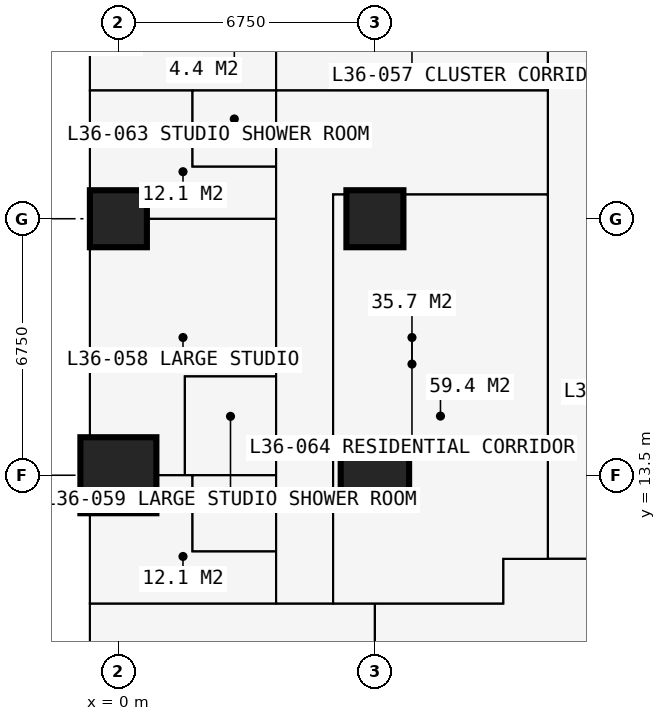
"""IFC4 building model, lengths in metres.
Left out: names, types, materials, properties, quantities, classifications, styles, units other than length and angle.
Written with IfcOpenShell. Run it as: python <this file> out.ifc"""

import sys

from ifc_helpers import new_model, si_unit, direction, frame, frame_2d, origin, origin_2d, place, context, subcontext, project, spatial, rectangle, extrude, element, fill, save


model = new_model("IFC4")
c1 = context("Model", 3, precision=1e-05, world=origin(), true_north=direction((0.0, 1.0)))
c2 = subcontext(c1, "Body", "Model", "MODEL_VIEW")
j1 = project(units=[si_unit("LENGTHUNIT", "METRE"), si_unit("PLANEANGLEUNIT", "RADIAN")], contexts=[c1])
p1 = place(None, origin())
s1 = spatial("IfcSite", under=j1, at=p1, CompositionType="ELEMENT")
p2 = place(p1, origin())
s2 = spatial("IfcBuilding", under=s1, at=p2, CompositionType="ELEMENT")
p3 = place(p2, frame((0.0, 0.0, 134.1)))
s3 = spatial("IfcBuildingStorey", under=s2, at=p3, CompositionType="ELEMENT", Elevation=134.1)
p4 = place(p3, frame((0.0, 13.5, 0.0), z_axis=(0.0, 0.0, 1.0), x_axis=(1.0, 0.0, 0.0)))
e1 = element("IfcColumn", 1, at=p4, inside=s3, PredefinedType="COLUMN", context=c2, shape_type="SweptSolid", body=[
    extrude(rectangle(XDim=2.0, YDim=2.0, at=origin_2d()), origin(), (0.0, 0.0, 1.0), 3.6),
])
p5 = place(p3, frame((0.0, 20.25, 0.0), z_axis=(0.0, 0.0, 1.0), x_axis=(1.0, 0.0, 0.0)))
e2 = element("IfcColumn", 2, at=p5, inside=s3, PredefinedType="COLUMN", context=c2, shape_type="SweptSolid", body=[
    extrude(rectangle(XDim=1.5, YDim=1.5, at=origin_2d()), origin(), (0.0, 0.0, 1.0), 3.6),
])
p6 = place(p3, frame((6.75, 13.5, 0.0), z_axis=(0.0, 0.0, 1.0), x_axis=(1.0, 0.0, 0.0)))
e3 = element("IfcColumn", 3, at=p6, inside=s3, PredefinedType="COLUMN", context=c2, shape_type="SweptSolid", body=[
    extrude(rectangle(XDim=1.8, YDim=1.8, at=origin_2d()), origin(), (0.0, 0.0, 1.0), 3.6),
])
p7 = place(p3, frame((6.75, 20.25, 0.0), z_axis=(0.0, 0.0, 1.0), x_axis=(1.0, 0.0, 0.0)))
e4 = element("IfcColumn", 4, at=p7, inside=s3, PredefinedType="COLUMN", context=c2, shape_type="SweptSolid", body=[
    extrude(rectangle(XDim=1.5, YDim=1.5, at=origin_2d()), origin(), (0.0, 0.0, 1.0), 3.6),
])
p8 = place(p3, frame((-0.734, 10.125, 0.0), z_axis=(0.0, 0.0, 1.0), x_axis=(1.0, 0.0, 0.0)))
e5 = element("IfcWall", 5, at=p8, inside=s3, PredefinedType="PARTITIONING", context=c2, shape_type="SweptSolid", body=[
    extrude(rectangle(XDim=10.859, YDim=0.15, at=frame_2d((5.429, 0.0))), origin(), (0.0, 0.0, 1.0), 3.3),
])
for number, where, z_axis, x_axis in (
    (6, (-0.734, 13.5, 0.0), (0.0, 0.0, 1.0), (1.0, 0.0, 0.0)),
    (7, (-0.734, 20.25, 0.0), (0.0, 0.0, 1.0), (1.0, 0.0, 0.0)),
):
    element("IfcWall", number, at=place(p3, frame(where, z_axis=z_axis, x_axis=x_axis)), inside=s3, PredefinedType="PARTITIONING", context=c2, shape_type="SweptSolid", body=[
        extrude(rectangle(XDim=4.884, YDim=0.175, at=frame_2d((2.442, 0.0))), origin(), (0.0, 0.0, 1.0), 2.802),
    ])
p9 = place(p3, frame((-0.734, 23.625, 0.0), z_axis=(0.0, 0.0, 1.0), x_axis=(1.0, 0.0, 0.0)))
e8 = element("IfcWall", 8, at=p9, inside=s3, PredefinedType="PARTITIONING", context=c2, shape_type="SweptSolid", body=[
    extrude(rectangle(XDim=12.034, YDim=0.15, at=frame_2d((6.017, 0.0))), origin(), (0.0, 0.0, 1.0), 3.3),
])
p10 = place(p3, frame((1.75, 13.5, 0.0), z_axis=(0.0, 0.0, 1.0), x_axis=(0.0, 1.0, 0.0)))
e9 = element("IfcWall", 9, at=p10, inside=s3, PredefinedType="PARTITIONING", context=c2, shape_type="SweptSolid", body=[
    extrude(rectangle(XDim=2.6, YDim=0.1, at=frame_2d((1.3, 0.0))), origin(), (0.0, 0.0, 1.0), 3.3),
])
p11 = place(p10, frame((1.05, 0.0, 0.0)))
e10 = element("IfcOpeningElement", 10, at=p11, cuts=e9, PredefinedType="OPENING", context=c2, shape_type="SweptSolid", body=[
    extrude(rectangle(XDim=0.9, YDim=2.2, at=frame_2d((0.45, 1.1))), frame((0.0, 0.06, 0.0), z_axis=(0.0, -1.0, 0.0), x_axis=(1.0, 0.0, 0.0)), (0.0, 0.0, 1.0), 0.12),
])
p12 = place(p3, frame((1.75, 16.1, 0.0), z_axis=(0.0, 0.0, 1.0), x_axis=(1.0, 0.0, 0.0)))
e11 = element("IfcWall", 11, at=p12, inside=s3, PredefinedType="PARTITIONING", context=c2, shape_type="SweptSolid", body=[
    extrude(rectangle(XDim=2.4, YDim=0.1, at=frame_2d((1.2, 0.0))), origin(), (0.0, 0.0, 1.0), 3.3),
])
p13 = place(p3, frame((1.95, 11.5, 0.0), z_axis=(0.0, 0.0, 1.0), x_axis=(0.0, 1.0, 0.0)))
e12 = element("IfcWall", 12, at=p13, inside=s3, PredefinedType="PARTITIONING", context=c2, shape_type="SweptSolid", body=[
    extrude(rectangle(XDim=2.0, YDim=0.1, at=frame_2d((1.0, 0.0))), origin(), (0.0, 0.0, 1.0), 3.3),
])
p14 = place(p3, frame((1.95, 11.5, 0.0), z_axis=(0.0, 0.0, 1.0), x_axis=(1.0, 0.0, 0.0)))
e13 = element("IfcWall", 13, at=p14, inside=s3, PredefinedType="PARTITIONING", context=c2, shape_type="SweptSolid", body=[
    extrude(rectangle(XDim=2.2, YDim=0.1, at=frame_2d((1.1, 0.0))), origin(), (0.0, 0.0, 1.0), 3.3),
])
p15 = place(p14, frame((0.65, 0.0, 0.0)))
e14 = element("IfcOpeningElement", 14, at=p15, cuts=e13, PredefinedType="OPENING", context=c2, shape_type="SweptSolid", body=[
    extrude(rectangle(XDim=0.9, YDim=2.2, at=frame_2d((0.45, 1.1))), frame((0.0, 0.06, 0.0), z_axis=(0.0, -1.0, 0.0), x_axis=(1.0, 0.0, 0.0)), (0.0, 0.0, 1.0), 0.12),
])
p16 = place(p3, frame((1.95, 21.625, 0.0), z_axis=(0.0, 0.0, 1.0), x_axis=(0.0, 1.0, 0.0)))
e15 = element("IfcWall", 15, at=p16, inside=s3, PredefinedType="PARTITIONING", context=c2, shape_type="SweptSolid", body=[
    extrude(rectangle(XDim=2.0, YDim=0.1, at=frame_2d((1.0, 0.0))), origin(), (0.0, 0.0, 1.0), 3.3),
])
p17 = place(p3, frame((1.95, 21.625, 0.0), z_axis=(0.0, 0.0, 1.0), x_axis=(1.0, 0.0, 0.0)))
e16 = element("IfcWall", 16, at=p17, inside=s3, PredefinedType="PARTITIONING", context=c2, shape_type="SweptSolid", body=[
    extrude(rectangle(XDim=2.2, YDim=0.1, at=frame_2d((1.1, 0.0))), origin(), (0.0, 0.0, 1.0), 3.3),
])
p18 = place(p17, frame((0.65, 0.0, 0.0)))
e17 = element("IfcOpeningElement", 17, at=p18, cuts=e16, PredefinedType="OPENING", context=c2, shape_type="SweptSolid", body=[
    extrude(rectangle(XDim=0.9, YDim=2.2, at=frame_2d((0.45, 1.1))), frame((0.0, 0.06, 0.0), z_axis=(0.0, -1.0, 0.0), x_axis=(1.0, 0.0, 0.0)), (0.0, 0.0, 1.0), 0.12),
])
p19 = place(p3, frame((4.15, 10.125, 0.0), z_axis=(0.0, 0.0, 1.0), x_axis=(0.0, 1.0, 0.0)))
e18 = element("IfcWall", 18, at=p19, inside=s3, PredefinedType="PARTITIONING", context=c2, shape_type="SweptSolid", body=[
    extrude(rectangle(XDim=16.875, YDim=0.15, at=frame_2d((8.438, 0.0))), origin(), (0.0, 0.0, 1.0), 3.3),
])
p20 = place(p19, frame((13.7, 0.0, 0.0)))
e19 = element("IfcOpeningElement", 19, at=p20, cuts=e18, PredefinedType="OPENING", context=c2, shape_type="SweptSolid", body=[
    extrude(rectangle(XDim=0.95, YDim=2.2, at=frame_2d((0.475, 1.1))), frame((0.0, 0.085, 0.0), z_axis=(0.0, -1.0, 0.0), x_axis=(1.0, 0.0, 0.0)), (0.0, 0.0, 1.0), 0.17),
])
p21 = place(p19, frame((7.575, 0.0, 0.0)))
e20 = element("IfcOpeningElement", 20, at=p21, cuts=e18, PredefinedType="OPENING", context=c2, shape_type="SweptSolid", body=[
    extrude(rectangle(XDim=0.95, YDim=2.2, at=frame_2d((0.475, 1.1))), frame((0.0, 0.085, 0.0), z_axis=(0.0, -1.0, 0.0), x_axis=(1.0, 0.0, 0.0)), (0.0, 0.0, 1.0), 0.17),
])
p22 = place(p19, frame((0.2, 0.0, 0.0)))
e21 = element("IfcOpeningElement", 21, at=p22, cuts=e18, PredefinedType="OPENING", context=c2, shape_type="SweptSolid", body=[
    extrude(rectangle(XDim=0.95, YDim=2.2, at=frame_2d((0.475, 1.1))), frame((0.0, 0.085, 0.0), z_axis=(0.0, -1.0, 0.0), x_axis=(1.0, 0.0, 0.0)), (0.0, 0.0, 1.0), 0.17),
])
p23 = place(p19, frame((10.375, 0.0, 0.0)))
e22 = element("IfcOpeningElement", 22, at=p23, cuts=e18, PredefinedType="OPENING", context=c2, shape_type="SweptSolid", body=[
    extrude(rectangle(XDim=0.95, YDim=2.2, at=frame_2d((0.475, 1.1))), frame((0.0, 0.085, 0.0), z_axis=(0.0, -1.0, 0.0), x_axis=(1.0, 0.0, 0.0)), (0.0, 0.0, 1.0), 0.17),
])
p24 = place(p3, frame((5.65, 10.125, 0.0), z_axis=(0.0, 0.0, 1.0), x_axis=(0.0, 1.0, 0.0)))
e23 = element("IfcWall", 23, at=p24, inside=s3, PredefinedType="PARTITIONING", context=c2, shape_type="SweptSolid", body=[
    extrude(rectangle(XDim=10.762, YDim=0.15, at=frame_2d((5.381, 0.0))), origin(), (0.0, 0.0, 1.0), 3.3),
])
p25 = place(p24, frame((4.9, 0.0, 0.0)))
e24 = element("IfcOpeningElement", 24, at=p25, cuts=e23, PredefinedType="OPENING", context=c2, shape_type="SweptSolid", body=[
    extrude(rectangle(XDim=0.95, YDim=2.2, at=frame_2d((0.475, 1.1))), frame((0.0, 0.085, 0.0), z_axis=(0.0, -1.0, 0.0), x_axis=(1.0, 0.0, 0.0)), (0.0, 0.0, 1.0), 0.17),
])
p26 = place(p3, frame((5.65, 20.887, 0.0), z_axis=(0.0, 0.0, 1.0), x_axis=(1.0, 0.0, 0.0)))
e25 = element("IfcWall", 25, at=p26, inside=s3, PredefinedType="PARTITIONING", context=c2, shape_type="SweptSolid", body=[
    extrude(rectangle(XDim=5.65, YDim=0.15, at=frame_2d((2.825, 0.0))), origin(), (0.0, 0.0, 1.0), 3.3),
])
p27 = place(p3, frame((6.75, 4.15, 0.0), z_axis=(0.0, 0.0, 1.0), x_axis=(0.0, 1.0, 0.0)))
e26 = element("IfcWall", 26, at=p27, inside=s3, PredefinedType="PARTITIONING", context=c2, shape_type="SweptSolid", body=[
    extrude(rectangle(XDim=5.975, YDim=0.15, at=frame_2d((2.988, 0.0))), origin(), (0.0, 0.0, 1.0), 2.802),
])
p28 = place(p3, frame((10.125, 10.125, 0.0), z_axis=(0.0, 0.0, 1.0), x_axis=(0.0, 1.0, 0.0)))
e27 = element("IfcWall", 27, at=p28, inside=s3, PredefinedType="PARTITIONING", context=c2, shape_type="SweptSolid", body=[
    extrude(rectangle(XDim=1.175, YDim=0.15, at=frame_2d((0.587, 0.0))), origin(), (0.0, 0.0, 1.0), 3.3),
])
p29 = place(p3, frame((10.125, 11.3, 0.0), z_axis=(0.0, 0.0, 1.0), x_axis=(1.0, 0.0, 0.0)))
e28 = element("IfcWall", 28, at=p29, inside=s3, PredefinedType="PARTITIONING", context=c2, shape_type="SweptSolid", body=[
    extrude(rectangle(XDim=20.675, YDim=0.15, at=frame_2d((10.337, 0.0))), origin(), (0.0, 0.0, 1.0), 3.3),
])
p30 = place(p29, frame((8.375, 0.0, 0.0)))
e29 = element("IfcOpeningElement", 29, at=p30, cuts=e28, PredefinedType="OPENING", context=c2, shape_type="SweptSolid", body=[
    extrude(rectangle(XDim=1.0, YDim=2.2, at=frame_2d((0.5, 1.1))), frame((0.0, 0.085, 0.0), z_axis=(0.0, -1.0, 0.0), x_axis=(1.0, 0.0, 0.0)), (0.0, 0.0, 1.0), 0.17),
])
p31 = place(p29, frame((10.975, 0.0, 0.0)))
e30 = element("IfcOpeningElement", 30, at=p31, cuts=e28, PredefinedType="OPENING", context=c2, shape_type="SweptSolid", body=[
    extrude(rectangle(XDim=1.0, YDim=2.2, at=frame_2d((0.5, 1.1))), frame((0.0, 0.085, 0.0), z_axis=(0.0, -1.0, 0.0), x_axis=(1.0, 0.0, 0.0)), (0.0, 0.0, 1.0), 0.17),
])
p32 = place(p29, frame((3.925, 0.0, 0.0)))
e31 = element("IfcOpeningElement", 31, at=p32, cuts=e28, PredefinedType="OPENING", context=c2, shape_type="SweptSolid", body=[
    extrude(rectangle(XDim=0.95, YDim=2.2, at=frame_2d((0.475, 1.1))), frame((0.0, 0.085, 0.0), z_axis=(0.0, -1.0, 0.0), x_axis=(1.0, 0.0, 0.0)), (0.0, 0.0, 1.0), 0.17),
])
p33 = place(p3, frame((11.3, 11.3, 0.0), z_axis=(0.0, 0.0, 1.0), x_axis=(0.0, 1.0, 0.0)))
e32 = element("IfcWall", 32, at=p33, inside=s3, PredefinedType="PARTITIONING", context=c2, shape_type="SweptSolid", body=[
    extrude(rectangle(XDim=19.3, YDim=0.15, at=frame_2d((9.65, 0.0))), origin(), (0.0, 0.0, 1.0), 3.3),
])
p34 = place(p33, frame((13.525, 0.0, 0.0)))
e33 = element("IfcOpeningElement", 33, at=p34, cuts=e32, PredefinedType="OPENING", context=c2, shape_type="SweptSolid", body=[
    extrude(rectangle(XDim=1.0, YDim=2.2, at=frame_2d((0.5, 1.1))), frame((0.0, 0.085, 0.0), z_axis=(0.0, -1.0, 0.0), x_axis=(1.0, 0.0, 0.0)), (0.0, 0.0, 1.0), 0.17),
])
p35 = place(p33, frame((10.438, 0.0, 0.0)))
e34 = element("IfcOpeningElement", 34, at=p35, cuts=e32, PredefinedType="OPENING", context=c2, shape_type="SweptSolid", body=[
    extrude(rectangle(XDim=1.0, YDim=2.2, at=frame_2d((0.5, 1.1))), frame((0.0, 0.085, 0.0), z_axis=(0.0, -1.0, 0.0), x_axis=(1.0, 0.0, 0.0)), (0.0, 0.0, 1.0), 0.17),
])
p36 = place(p20, origin())
e35 = element("IfcDoor", 35, at=p36, inside=s3, OperationType="SINGLE_SWING_LEFT", PredefinedType="DOOR", context=c2, shape_type="SweptSolid", body=[
    extrude(rectangle(XDim=0.95, YDim=2.2, at=frame_2d((0.475, 1.1))), frame((0.0, 0.025, 0.0), z_axis=(0.0, -1.0, 0.0), x_axis=(1.0, 0.0, 0.0)), (0.0, 0.0, 1.0), 0.05),
])
fill(e19, e35)
p37 = place(p21, origin())
e36 = element("IfcDoor", 36, at=p37, inside=s3, OperationType="SINGLE_SWING_LEFT", PredefinedType="DOOR", context=c2, shape_type="SweptSolid", body=[
    extrude(rectangle(XDim=0.95, YDim=2.2, at=frame_2d((0.475, 1.1))), frame((0.0, 0.025, 0.0), z_axis=(0.0, -1.0, 0.0), x_axis=(1.0, 0.0, 0.0)), (0.0, 0.0, 1.0), 0.05),
])
fill(e20, e36)
p38 = place(p11, origin())
e37 = element("IfcDoor", 37, at=p38, inside=s3, OperationType="SINGLE_SWING_RIGHT", PredefinedType="DOOR", context=c2, shape_type="SweptSolid", body=[
    extrude(rectangle(XDim=0.9, YDim=2.2, at=frame_2d((0.45, 1.1))), frame((0.0, 0.025, 0.0), z_axis=(0.0, -1.0, 0.0), x_axis=(1.0, 0.0, 0.0)), (0.0, 0.0, 1.0), 0.05),
])
fill(e10, e37)
p39 = place(p22, origin())
e38 = element("IfcDoor", 38, at=p39, inside=s3, OperationType="SINGLE_SWING_LEFT", PredefinedType="DOOR", context=c2, shape_type="SweptSolid", body=[
    extrude(rectangle(XDim=0.95, YDim=2.2, at=frame_2d((0.475, 1.1))), frame((0.0, 0.025, 0.0), z_axis=(0.0, -1.0, 0.0), x_axis=(1.0, 0.0, 0.0)), (0.0, 0.0, 1.0), 0.05),
])
fill(e21, e38)
p40 = place(p15, origin())
e39 = element("IfcDoor", 39, at=p40, inside=s3, OperationType="SINGLE_SWING_RIGHT", PredefinedType="DOOR", context=c2, shape_type="SweptSolid", body=[
    extrude(rectangle(XDim=0.9, YDim=2.2, at=frame_2d((0.45, 1.1))), frame((0.0, 0.025, 0.0), z_axis=(0.0, -1.0, 0.0), x_axis=(1.0, 0.0, 0.0)), (0.0, 0.0, 1.0), 0.05),
])
fill(e14, e39)
p41 = place(p23, origin())
e40 = element("IfcDoor", 40, at=p41, inside=s3, OperationType="SINGLE_SWING_LEFT", PredefinedType="DOOR", context=c2, shape_type="SweptSolid", body=[
    extrude(rectangle(XDim=0.95, YDim=2.2, at=frame_2d((0.475, 1.1))), frame((0.0, 0.025, 0.0), z_axis=(0.0, -1.0, 0.0), x_axis=(1.0, 0.0, 0.0)), (0.0, 0.0, 1.0), 0.05),
])
fill(e22, e40)
p42 = place(p18, origin())
e41 = element("IfcDoor", 41, at=p42, inside=s3, OperationType="SINGLE_SWING_RIGHT", PredefinedType="DOOR", context=c2, shape_type="SweptSolid", body=[
    extrude(rectangle(XDim=0.9, YDim=2.2, at=frame_2d((0.45, 1.1))), frame((0.0, 0.025, 0.0), z_axis=(0.0, -1.0, 0.0), x_axis=(1.0, 0.0, 0.0)), (0.0, 0.0, 1.0), 0.05),
])
fill(e17, e41)
p43 = place(p35, origin())
e42 = element("IfcDoor", 42, at=p43, inside=s3, OperationType="SINGLE_SWING_LEFT", PredefinedType="DOOR", context=c2, shape_type="SweptSolid", body=[
    extrude(rectangle(XDim=1.0, YDim=2.2, at=frame_2d((0.5, 1.1))), frame((0.0, 0.025, 0.0), z_axis=(0.0, -1.0, 0.0), x_axis=(1.0, 0.0, 0.0)), (0.0, 0.0, 1.0), 0.05),
])
fill(e34, e42)
p44 = place(p25, origin())
e43 = element("IfcDoor", 43, at=p44, inside=s3, OperationType="SINGLE_SWING_LEFT", PredefinedType="DOOR", context=c2, shape_type="SweptSolid", body=[
    extrude(rectangle(XDim=0.95, YDim=2.2, at=frame_2d((0.475, 1.1))), frame((0.0, 0.025, 0.0), z_axis=(0.0, -1.0, 0.0), x_axis=(1.0, 0.0, 0.0)), (0.0, 0.0, 1.0), 0.05),
])
fill(e24, e43)
save(model, sys.argv[1])
